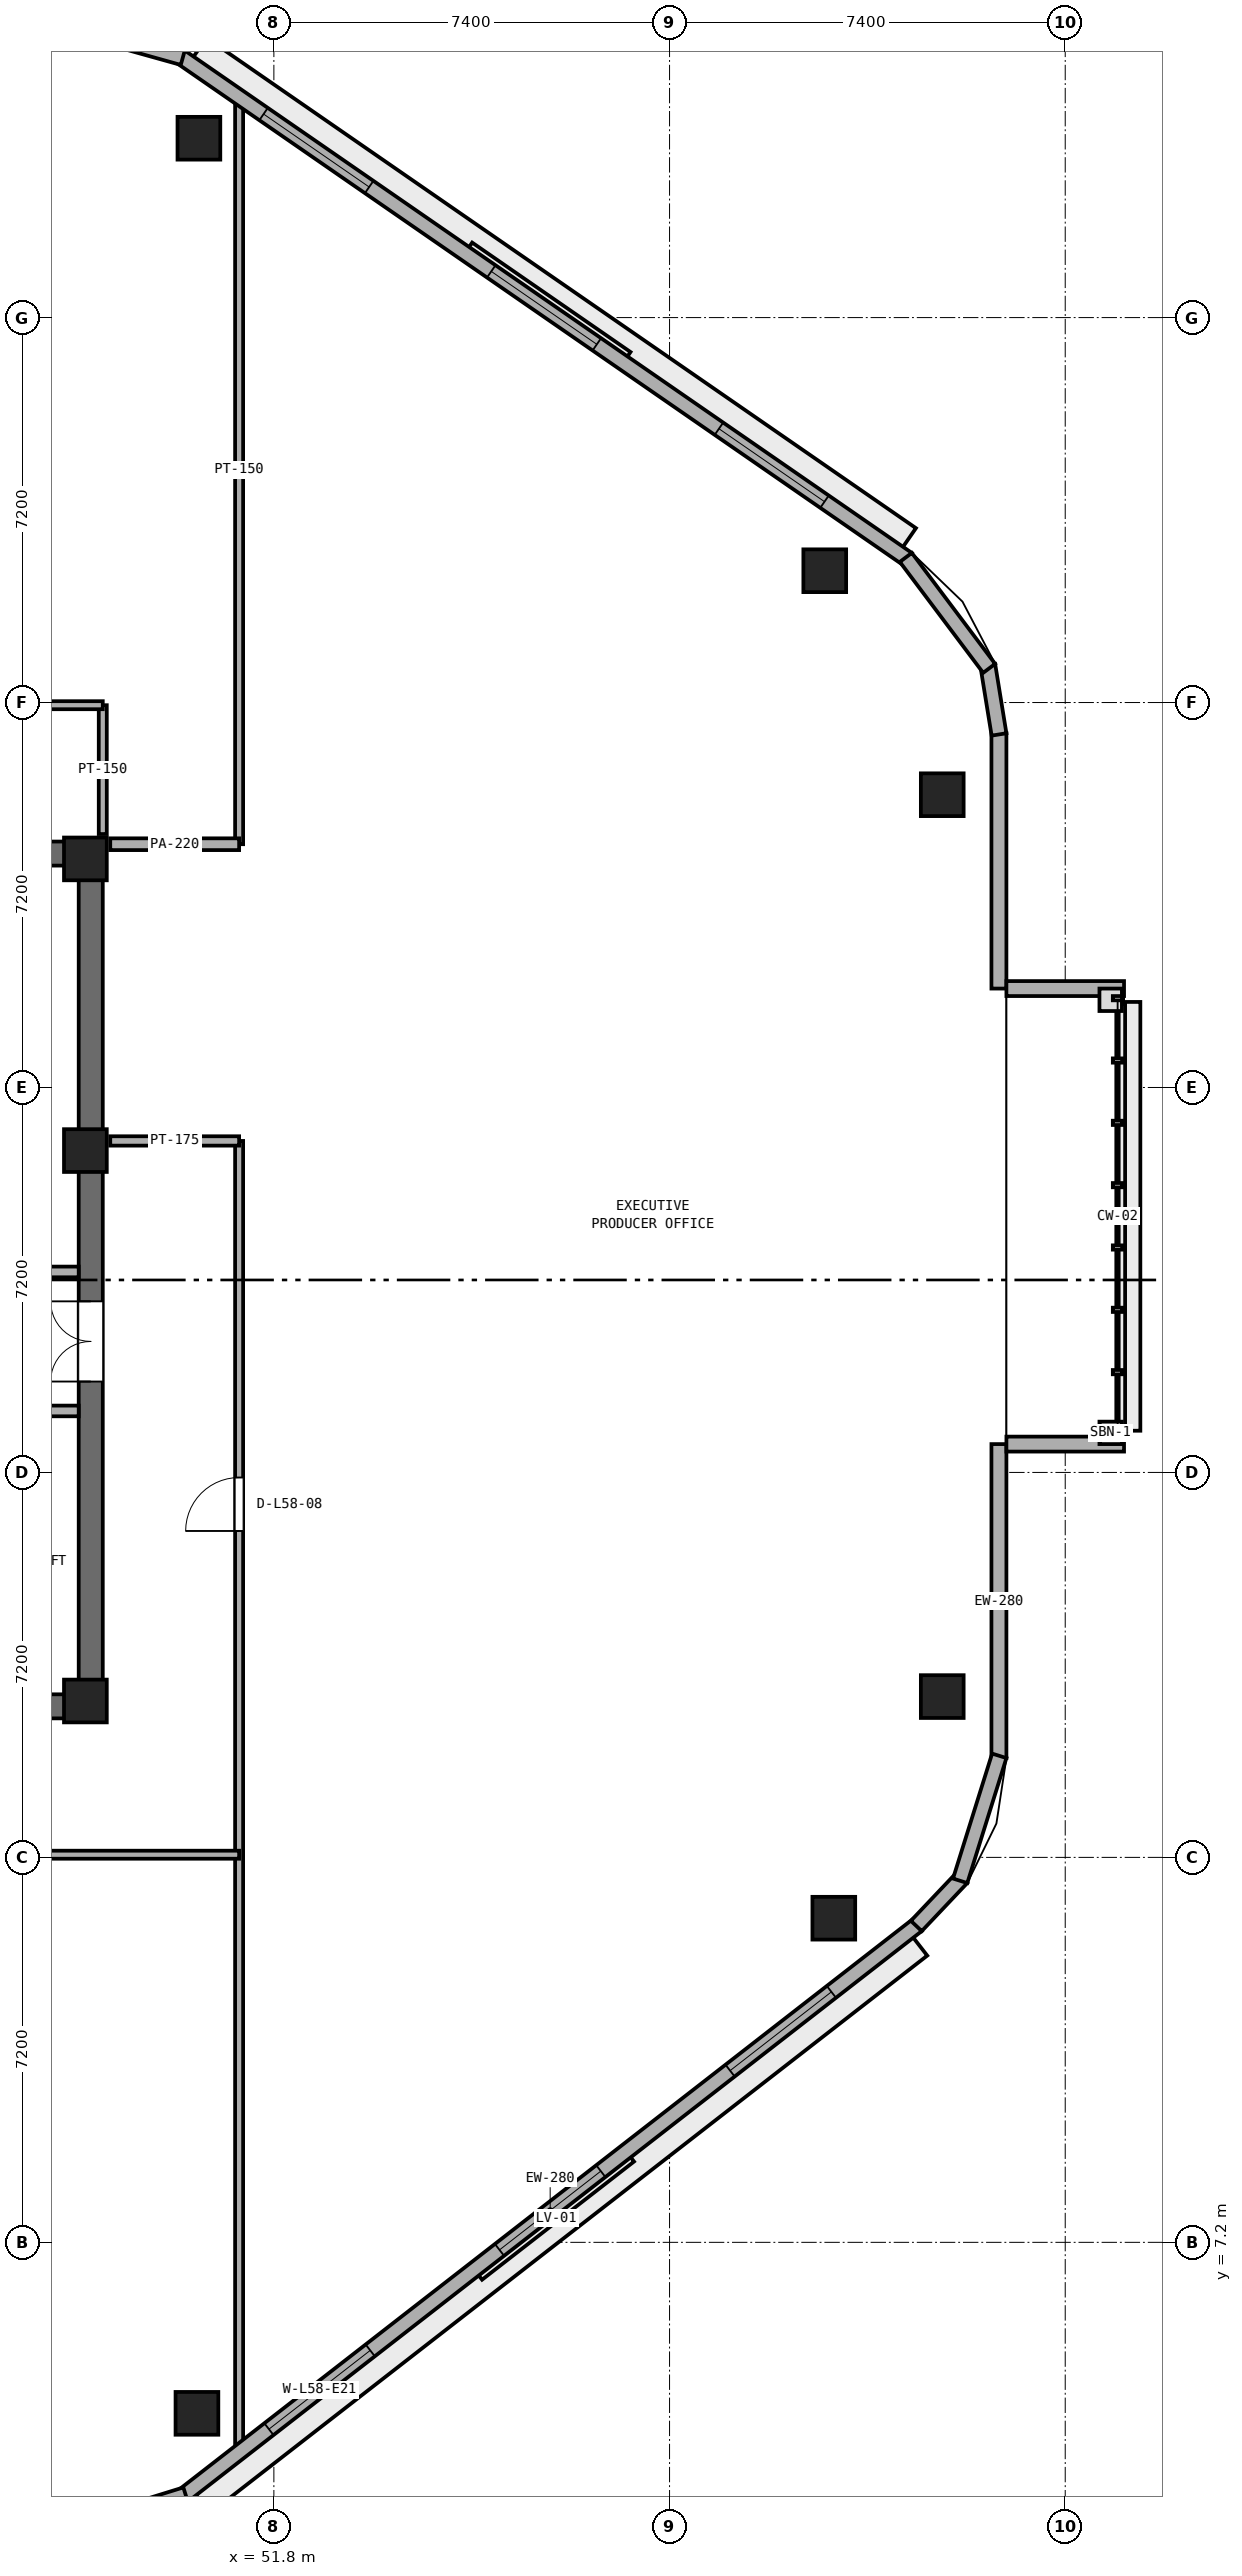
"""IFC4 building model, lengths in metres.
Left out: names, types, materials, properties, quantities, classifications, styles, units other than length and angle.
Written with IfcOpenShell. Run it as: python <this file> out.ifc"""

import sys

from ifc_helpers import new_model, si_unit, direction, frame, frame_2d, origin, origin_2d, place, context, subcontext, project, spatial, rectangle, extrude, element, fill, save


model = new_model("IFC4")
c1 = context("Model", 3, precision=1e-05, world=origin(), true_north=direction((0.0, 1.0)))
c2 = subcontext(c1, "Body", "Model", "MODEL_VIEW")
j1 = project(units=[si_unit("LENGTHUNIT", "METRE"), si_unit("PLANEANGLEUNIT", "RADIAN")], contexts=[c1])
p1 = place(None, origin())
s1 = spatial("IfcSite", under=j1, at=p1, CompositionType="ELEMENT")
p2 = place(p1, origin())
s2 = spatial("IfcBuilding", under=s1, at=p2, CompositionType="ELEMENT")
p3 = place(p2, frame((0.0, 0.0, 228.8)))
s3 = spatial("IfcBuildingStorey", under=s2, at=p3, CompositionType="ELEMENT", Elevation=228.8)
for number, where, z_axis, x_axis in (
    (1, (25.4, 17.225, 0.0), (0.0, 0.0, 1.0), (1.0, 0.0, 0.0)),
    (2, (25.4, 33.175, 0.0), (0.0, 0.0, 1.0), (1.0, 0.0, 0.0)),
):
    element("IfcWall", number, at=place(p3, frame(where, z_axis=z_axis, x_axis=x_axis)), inside=s3, PredefinedType="SHEAR", context=c2, shape_type="SweptSolid", body=[
        extrude(rectangle(XDim=23.2, YDim=0.45, at=frame_2d((11.6, 0.0))), origin(), (0.0, 0.0, 1.0), 3.51),
    ])
p4 = place(p3, frame((48.375, 17.45, 0.0), z_axis=(0.0, 0.0, 1.0), x_axis=(0.0, 1.0, 0.0)))
e3 = element("IfcWall", 3, at=p4, inside=s3, PredefinedType="SHEAR", context=c2, shape_type="SweptSolid", body=[
    extrude(rectangle(XDim=15.5, YDim=0.45, at=frame_2d((7.75, 0.0))), origin(), (0.0, 0.0, 1.0), 3.51),
])
p5 = place(p4, frame((5.85, 0.0, 0.0)))
e4 = element("IfcOpeningElement", 4, at=p5, cuts=e3, PredefinedType="OPENING", context=c2, shape_type="SweptSolid", body=[
    extrude(rectangle(XDim=1.5, YDim=2.15, at=frame_2d((0.75, 1.075))), frame((0.0, 0.235, 0.0), z_axis=(0.0, -1.0, 0.0), x_axis=(1.0, 0.0, 0.0)), (0.0, 0.0, 1.0), 0.47),
])
for number, where, z_axis, x_axis in (
    (5, (48.275, 17.325, 0.0), (0.0, 0.0, 1.0), (1.0, 0.0, 0.0)),
    (6, (48.275, 27.62, 0.0), (0.0, 0.0, 1.0), (1.0, 0.0, 0.0)),
    (7, (48.275, 33.075, 0.0), (0.0, 0.0, 1.0), (1.0, 0.0, 0.0)),
):
    element("IfcColumn", number, at=place(p3, frame(where, z_axis=z_axis, x_axis=x_axis)), inside=s3, PredefinedType="PILASTER", context=c2, shape_type="SweptSolid", body=[
        extrude(rectangle(XDim=0.8, YDim=0.8, at=origin_2d()), origin(), (0.0, 0.0, 1.0), 3.8),
    ])
for number, where, z_axis, x_axis in (
    (8, (50.361, 4.002, 0.0), (0.0, 0.0, 1.0), (1.0, 0.0, 0.0)),
    (9, (62.272, 13.262, 0.0), (0.0, 0.0, 1.0), (1.0, 0.0, 0.0)),
    (10, (64.3, 17.408, 0.0), (0.0, 0.0, 1.0), (1.0, 0.0, 0.0)),
    (11, (64.3, 34.276, 0.0), (0.0, 0.0, 1.0), (1.0, 0.0, 0.0)),
    (12, (62.103, 38.465, 0.0), (0.0, 0.0, 1.0), (1.0, 0.0, 0.0)),
    (13, (50.398, 46.554, 0.0), (0.0, 0.0, 1.0), (1.0, 0.0, 0.0)),
):
    element("IfcColumn", number, at=place(p3, frame(where, z_axis=z_axis, x_axis=x_axis)), inside=s3, PredefinedType="COLUMN", context=c2, shape_type="SweptSolid", body=[
        extrude(rectangle(XDim=0.8, YDim=0.8, at=origin_2d()), origin(), (0.0, 0.0, 1.0), 3.8),
    ])
p6 = place(p3, frame((42.0, 22.75, 0.0), z_axis=(0.0, 0.0, 1.0), x_axis=(1.0, 0.0, 0.0)))
e14 = element("IfcWall", 14, at=p6, inside=s3, PredefinedType="SOLIDWALL", context=c2, shape_type="SweptSolid", body=[
    extrude(rectangle(XDim=6.15, YDim=0.2, at=frame_2d((3.075, 0.0))), origin(), (0.0, 0.0, 1.0), 3.51),
])
p7 = place(p3, frame((46.1, 25.35, 0.0), z_axis=(0.0, 0.0, 1.0), x_axis=(1.0, 0.0, 0.0)))
e15 = element("IfcWall", 15, at=p7, inside=s3, PredefinedType="SOLIDWALL", context=c2, shape_type="SweptSolid", body=[
    extrude(rectangle(XDim=2.05, YDim=0.2, at=frame_2d((1.025, 0.0))), origin(), (0.0, 0.0, 1.0), 3.51),
])
p8 = place(p3, frame((51.15, 3.235, 0.0), z_axis=(0.0, 0.0, 1.0), x_axis=(0.0, 1.0, 0.0)))
e16 = element("IfcWall", 16, at=p8, inside=s3, PredefinedType="PARTITIONING", context=c2, shape_type="SweptSolid", body=[
    extrude(rectangle(XDim=24.565, YDim=0.15, at=frame_2d((12.283, 0.0))), origin(), (0.0, 0.0, 1.0), 3.51),
])
p9 = place(p8, frame((17.27, 0.0, 0.0)))
e17 = element("IfcOpeningElement", 17, at=p9, cuts=e16, PredefinedType="OPENING", context=c2, shape_type="SweptSolid", body=[
    extrude(rectangle(XDim=1.0, YDim=2.12, at=frame_2d((0.5, 1.06))), frame((0.0, 0.085, 0.0), z_axis=(0.0, -1.0, 0.0), x_axis=(1.0, 0.0, 0.0)), (0.0, 0.0, 1.0), 0.17),
])
p10 = place(p3, frame((51.15, 33.35, 0.0), z_axis=(0.0, 0.0, 1.0), x_axis=(0.0, 1.0, 0.0)))
e18 = element("IfcWall", 18, at=p10, inside=s3, PredefinedType="PARTITIONING", context=c2, shape_type="SweptSolid", body=[
    extrude(rectangle(XDim=14.003, YDim=0.15, at=frame_2d((7.002, 0.0))), origin(), (0.0, 0.0, 1.0), 3.51),
])
p11 = place(p3, frame((48.6, 33.54, 0.0), z_axis=(0.0, 0.0, 1.0), x_axis=(0.0, 1.0, 0.0)))
e19 = element("IfcWall", 19, at=p11, inside=s3, PredefinedType="PARTITIONING", context=c2, shape_type="SweptSolid", body=[
    extrude(rectangle(XDim=2.41, YDim=0.15, at=frame_2d((1.205, 0.0))), origin(), (0.0, 0.0, 1.0), 2.893),
])
p12 = place(p3, frame((38.35, 14.45, 0.0), z_axis=(0.0, 0.0, 1.0), x_axis=(1.0, 0.0, 0.0)))
e20 = element("IfcWall", 20, at=p12, inside=s3, PredefinedType="PARTITIONING", context=c2, shape_type="SweptSolid", body=[
    extrude(rectangle(XDim=12.8, YDim=0.15, at=frame_2d((6.4, 0.0))), origin(), (0.0, 0.0, 1.0), 3.51),
])
p13 = place(p12, frame((5.9, 0.0, 0.0)))
e21 = element("IfcOpeningElement", 21, at=p13, cuts=e20, PredefinedType="OPENING", context=c2, shape_type="SweptSolid", body=[
    extrude(rectangle(XDim=1.0, YDim=2.12, at=frame_2d((0.5, 1.06))), frame((0.0, 0.085, 0.0), z_axis=(0.0, -1.0, 0.0), x_axis=(1.0, 0.0, 0.0)), (0.0, 0.0, 1.0), 0.17),
])
p14 = place(p3, frame((48.74, 27.8, 0.0), z_axis=(0.0, 0.0, 1.0), x_axis=(1.0, 0.0, 0.0)))
e22 = element("IfcWall", 22, at=p14, inside=s3, PredefinedType="PARTITIONING", context=c2, shape_type="SweptSolid", body=[
    extrude(rectangle(XDim=2.41, YDim=0.175, at=frame_2d((1.205, 0.0))), origin(), (0.0, 0.0, 1.0), 3.51),
])
p15 = place(p3, frame((48.74, 33.35, 0.0), z_axis=(0.0, 0.0, 1.0), x_axis=(1.0, 0.0, 0.0)))
e23 = element("IfcWall", 23, at=p15, inside=s3, PredefinedType="PARTITIONING", context=c2, shape_type="SweptSolid", body=[
    extrude(rectangle(XDim=2.41, YDim=0.22, at=frame_2d((1.205, 0.0))), origin(), (0.0, 0.0, 1.0), 2.893),
])
p16 = place(p3, frame((22.85, 35.95, 0.0), z_axis=(0.0, 0.0, 1.0), x_axis=(1.0, 0.0, 0.0)))
e24 = element("IfcWall", 24, at=p16, inside=s3, PredefinedType="PARTITIONING", context=c2, shape_type="SweptSolid", body=[
    extrude(rectangle(XDim=25.75, YDim=0.15, at=frame_2d((12.875, 0.0))), origin(), (0.0, 0.0, 1.0), 3.51),
])
p17 = place(p16, frame((3.395, 0.0, 0.0)))
e25 = element("IfcOpeningElement", 25, at=p17, cuts=e24, PredefinedType="OPENING", context=c2, shape_type="SweptSolid", body=[
    extrude(rectangle(XDim=1.0, YDim=2.12, at=frame_2d((0.5, 1.06))), frame((0.0, 0.085, 0.0), z_axis=(0.0, -1.0, 0.0), x_axis=(1.0, 0.0, 0.0)), (0.0, 0.0, 1.0), 0.17),
])
p18 = place(p16, frame((16.03, 0.0, 0.0)))
e26 = element("IfcOpeningElement", 26, at=p18, cuts=e24, PredefinedType="OPENING", context=c2, shape_type="SweptSolid", body=[
    extrude(rectangle(XDim=1.0, YDim=2.12, at=frame_2d((0.5, 1.06))), frame((0.0, 0.085, 0.0), z_axis=(0.0, -1.0, 0.0), x_axis=(1.0, 0.0, 0.0)), (0.0, 0.0, 1.0), 0.17),
])
p19 = place(p3, frame((50.104, 2.459, 0.0), z_axis=(0.0, 0.0, 1.0), x_axis=(0.789464857485, 0.613795763097, 0.0)))
e27 = element("IfcWall", 27, at=p19, inside=s3, PredefinedType="STANDARD", context=c2, shape_type="SweptSolid", body=[
    extrude(rectangle(XDim=17.387, YDim=0.28, at=frame_2d((8.694, 0.0))), origin(), (0.0, 0.0, 1.0), 3.51),
])
p20 = place(p19, frame((2.031, 0.0, 0.9)))
e28 = element("IfcOpeningElement", 28, at=p20, cuts=e27, PredefinedType="OPENING", context=c2, shape_type="SweptSolid", body=[
    extrude(rectangle(XDim=2.4, YDim=1.75, at=frame_2d((1.2, 0.875))), frame((0.0, 0.15, 0.0), z_axis=(0.0, -1.0, 0.0), x_axis=(1.0, 0.0, 0.0)), (0.0, 0.0, 1.0), 0.3),
])
p21 = place(p19, frame((7.494, 0.0, 0.9)))
e29 = element("IfcOpeningElement", 29, at=p21, cuts=e27, PredefinedType="OPENING", context=c2, shape_type="SweptSolid", body=[
    extrude(rectangle(XDim=2.4, YDim=1.75, at=frame_2d((1.2, 0.875))), frame((0.0, 0.15, 0.0), z_axis=(0.0, -1.0, 0.0), x_axis=(1.0, 0.0, 0.0)), (0.0, 0.0, 1.0), 0.3),
])
p22 = place(p19, frame((12.956, 0.0, 0.9)))
e30 = element("IfcOpeningElement", 30, at=p22, cuts=e27, PredefinedType="OPENING", context=c2, shape_type="SweptSolid", body=[
    extrude(rectangle(XDim=2.4, YDim=1.75, at=frame_2d((1.2, 0.875))), frame((0.0, 0.15, 0.0), z_axis=(0.0, -1.0, 0.0), x_axis=(1.0, 0.0, 0.0)), (0.0, 0.0, 1.0), 0.3),
])
p23 = place(p3, frame((65.36, 16.258, 0.0), z_axis=(0.0, 0.0, 1.0), x_axis=(0.0, 1.0, 0.0)))
e31 = element("IfcWall", 31, at=p23, inside=s3, PredefinedType="STANDARD", context=c2, shape_type="SweptSolid", body=[
    extrude(rectangle(XDim=5.872, YDim=0.28, at=frame_2d((2.936, 0.0))), origin(), (0.0, 0.0, 1.0), 3.51),
])
p24 = place(p3, frame((65.36, 30.65, 0.0), z_axis=(0.0, 0.0, 1.0), x_axis=(0.0, 1.0, 0.0)))
e32 = element("IfcWall", 32, at=p24, inside=s3, PredefinedType="STANDARD", context=c2, shape_type="SweptSolid", body=[
    extrude(rectangle(XDim=4.776, YDim=0.28, at=frame_2d((2.388, 0.0))), origin(), (0.0, 0.0, 1.0), 3.51),
])
p25 = place(p3, frame((63.651, 38.683, 0.0), z_axis=(0.0, 0.0, 1.0), x_axis=(-0.822655095, 0.568540759022, 0.0)))
e33 = element("IfcWall", 33, at=p25, inside=s3, PredefinedType="STANDARD", context=c2, shape_type="SweptSolid", body=[
    extrude(rectangle(XDim=16.528, YDim=0.28, at=frame_2d((8.264, 0.0))), origin(), (0.0, 0.0, 1.0), 3.51),
])
p26 = place(p25, frame((1.888, 0.0, 0.9)))
e34 = element("IfcOpeningElement", 34, at=p26, cuts=e33, PredefinedType="OPENING", context=c2, shape_type="SweptSolid", body=[
    extrude(rectangle(XDim=2.4, YDim=1.75, at=frame_2d((1.2, 0.875))), frame((0.0, 0.15, 0.0), z_axis=(0.0, -1.0, 0.0), x_axis=(1.0, 0.0, 0.0)), (0.0, 0.0, 1.0), 0.3),
])
p27 = place(p25, frame((7.064, 0.0, 0.9)))
e35 = element("IfcOpeningElement", 35, at=p27, cuts=e33, PredefinedType="OPENING", context=c2, shape_type="SweptSolid", body=[
    extrude(rectangle(XDim=2.4, YDim=1.75, at=frame_2d((1.2, 0.875))), frame((0.0, 0.15, 0.0), z_axis=(0.0, -1.0, 0.0), x_axis=(1.0, 0.0, 0.0)), (0.0, 0.0, 1.0), 0.3),
])
p28 = place(p25, frame((12.24, 0.0, 0.9)))
e36 = element("IfcOpeningElement", 36, at=p28, cuts=e33, PredefinedType="OPENING", context=c2, shape_type="SweptSolid", body=[
    extrude(rectangle(XDim=2.4, YDim=1.75, at=frame_2d((1.2, 0.875))), frame((0.0, 0.15, 0.0), z_axis=(0.0, -1.0, 0.0), x_axis=(1.0, 0.0, 0.0)), (0.0, 0.0, 1.0), 0.3),
])
p29 = place(p3, frame((47.386, 1.626, 0.0), z_axis=(0.0, 0.0, 1.0), x_axis=(0.955189316149, 0.29599555793, 0.0)))
e37 = element("IfcWall", 37, at=p29, inside=s3, PredefinedType="STANDARD", context=c2, shape_type="SweptSolid", body=[
    extrude(rectangle(XDim=2.892, YDim=0.28, at=frame_2d((1.446, 0.0))), origin(), (0.0, 0.0, 1.0), 3.51),
])
p30 = place(p3, frame((63.815, 13.117, 0.0), z_axis=(0.0, 0.0, 1.0), x_axis=(0.687733716128, 0.725963040176, 0.0)))
e38 = element("IfcWall", 38, at=p30, inside=s3, PredefinedType="STANDARD", context=c2, shape_type="SweptSolid", body=[
    extrude(rectangle(XDim=1.239, YDim=0.28, at=frame_2d((0.62, 0.0))), origin(), (0.0, 0.0, 1.0), 3.51),
])
p31 = place(p3, frame((64.635, 13.962, 0.0), z_axis=(0.0, 0.0, 1.0), x_axis=(0.298649578722, 0.954362839348, 0.0)))
e39 = element("IfcWall", 39, at=p31, inside=s3, PredefinedType="STANDARD", context=c2, shape_type="SweptSolid", body=[
    extrude(rectangle(XDim=2.449, YDim=0.28, at=frame_2d((1.225, 0.0))), origin(), (0.0, 0.0, 1.0), 3.51),
])
p32 = place(p3, frame((65.362, 35.403, 0.0), z_axis=(0.0, 0.0, 1.0), x_axis=(-0.160271674114, 0.987072940809, 0.0)))
e40 = element("IfcWall", 40, at=p32, inside=s3, PredefinedType="STANDARD", context=c2, shape_type="SweptSolid", body=[
    extrude(rectangle(XDim=1.315, YDim=0.28, at=frame_2d((0.657, 0.0))), origin(), (0.0, 0.0, 1.0), 3.51),
])
p33 = place(p3, frame((65.177, 36.639, 0.0), z_axis=(0.0, 0.0, 1.0), x_axis=(-0.600436386467, 0.799672524104, 0.0)))
e41 = element("IfcWall", 41, at=p33, inside=s3, PredefinedType="STANDARD", context=c2, shape_type="SweptSolid", body=[
    extrude(rectangle(XDim=2.595, YDim=0.28, at=frame_2d((1.298, 0.0))), origin(), (0.0, 0.0, 1.0), 3.51),
])
p34 = place(p3, frame((50.096, 48.061, 0.0), z_axis=(0.0, 0.0, 1.0), x_axis=(-0.963108887091, 0.269112005688, 0.0)))
e42 = element("IfcWall", 42, at=p34, inside=s3, PredefinedType="STANDARD", context=c2, shape_type="SweptSolid", body=[
    extrude(rectangle(XDim=2.675, YDim=0.28, at=frame_2d((1.338, 0.0))), origin(), (0.0, 0.0, 1.0), 3.51),
])
for number, where, z_axis, x_axis in (
    (43, (65.5, 22.13, 0.0), (0.0, 0.0, 1.0), (1.0, 0.0, 0.0)),
    (44, (65.5, 30.65, 0.0), (0.0, 0.0, 1.0), (1.0, 0.0, 0.0)),
):
    element("IfcWall", number, at=place(p3, frame(where, z_axis=z_axis, x_axis=x_axis)), inside=s3, PredefinedType="STANDARD", context=c2, shape_type="SweptSolid", body=[
        extrude(rectangle(XDim=2.2, YDim=0.28, at=frame_2d((1.1, 0.0))), origin(), (0.0, 0.0, 1.0), 3.51),
    ])
p35 = place(p5, origin())
e45 = element("IfcDoor", 45, at=p35, inside=s3, OperationType="DOUBLE_DOOR_SINGLE_SWING", PredefinedType="DOOR", context=c2, shape_type="SweptSolid", body=[
    extrude(rectangle(XDim=1.5, YDim=2.15, at=frame_2d((0.75, 1.075))), frame((0.0, 0.025, 0.0), z_axis=(0.0, -1.0, 0.0), x_axis=(1.0, 0.0, 0.0)), (0.0, 0.0, 1.0), 0.05),
])
fill(e4, e45)
p36 = place(p9, origin())
e46 = element("IfcDoor", 46, at=p36, inside=s3, OperationType="SINGLE_SWING_LEFT", PredefinedType="DOOR", context=c2, shape_type="SweptSolid", body=[
    extrude(rectangle(XDim=1.0, YDim=2.12, at=frame_2d((0.5, 1.06))), frame((0.0, 0.025, 0.0), z_axis=(0.0, -1.0, 0.0), x_axis=(1.0, 0.0, 0.0)), (0.0, 0.0, 1.0), 0.05),
])
fill(e17, e46)
p37 = place(p20, origin())
e47 = element("IfcWindow", 47, at=p37, inside=s3, PartitioningType="SINGLE_PANEL", PredefinedType="WINDOW", context=c2, shape_type="SweptSolid", body=[
    extrude(rectangle(XDim=2.4, YDim=1.75, at=frame_2d((1.2, 0.875))), frame((0.0, 0.03, 0.0), z_axis=(0.0, -1.0, 0.0), x_axis=(1.0, 0.0, 0.0)), (0.0, 0.0, 1.0), 0.06),
])
fill(e28, e47)
p38 = place(p21, origin())
e48 = element("IfcWindow", 48, at=p38, inside=s3, PartitioningType="SINGLE_PANEL", PredefinedType="WINDOW", context=c2, shape_type="SweptSolid", body=[
    extrude(rectangle(XDim=2.4, YDim=1.75, at=frame_2d((1.2, 0.875))), frame((0.0, 0.03, 0.0), z_axis=(0.0, -1.0, 0.0), x_axis=(1.0, 0.0, 0.0)), (0.0, 0.0, 1.0), 0.06),
])
fill(e29, e48)
p39 = place(p22, origin())
e49 = element("IfcWindow", 49, at=p39, inside=s3, PartitioningType="SINGLE_PANEL", PredefinedType="WINDOW", context=c2, shape_type="SweptSolid", body=[
    extrude(rectangle(XDim=2.4, YDim=1.75, at=frame_2d((1.2, 0.875))), frame((0.0, 0.03, 0.0), z_axis=(0.0, -1.0, 0.0), x_axis=(1.0, 0.0, 0.0)), (0.0, 0.0, 1.0), 0.06),
])
fill(e30, e49)
p40 = place(p26, origin())
e50 = element("IfcWindow", 50, at=p40, inside=s3, PartitioningType="SINGLE_PANEL", PredefinedType="WINDOW", context=c2, shape_type="SweptSolid", body=[
    extrude(rectangle(XDim=2.4, YDim=1.75, at=frame_2d((1.2, 0.875))), frame((0.0, 0.03, 0.0), z_axis=(0.0, -1.0, 0.0), x_axis=(1.0, 0.0, 0.0)), (0.0, 0.0, 1.0), 0.06),
])
fill(e34, e50)
p41 = place(p27, origin())
e51 = element("IfcWindow", 51, at=p41, inside=s3, PartitioningType="SINGLE_PANEL", PredefinedType="WINDOW", context=c2, shape_type="SweptSolid", body=[
    extrude(rectangle(XDim=2.4, YDim=1.75, at=frame_2d((1.2, 0.875))), frame((0.0, 0.03, 0.0), z_axis=(0.0, -1.0, 0.0), x_axis=(1.0, 0.0, 0.0)), (0.0, 0.0, 1.0), 0.06),
])
fill(e35, e51)
p42 = place(p28, origin())
e52 = element("IfcWindow", 52, at=p42, inside=s3, PartitioningType="SINGLE_PANEL", PredefinedType="WINDOW", context=c2, shape_type="SweptSolid", body=[
    extrude(rectangle(XDim=2.4, YDim=1.75, at=frame_2d((1.2, 0.875))), frame((0.0, 0.03, 0.0), z_axis=(0.0, -1.0, 0.0), x_axis=(1.0, 0.0, 0.0)), (0.0, 0.0, 1.0), 0.06),
])
fill(e36, e52)
save(model, sys.argv[1])
